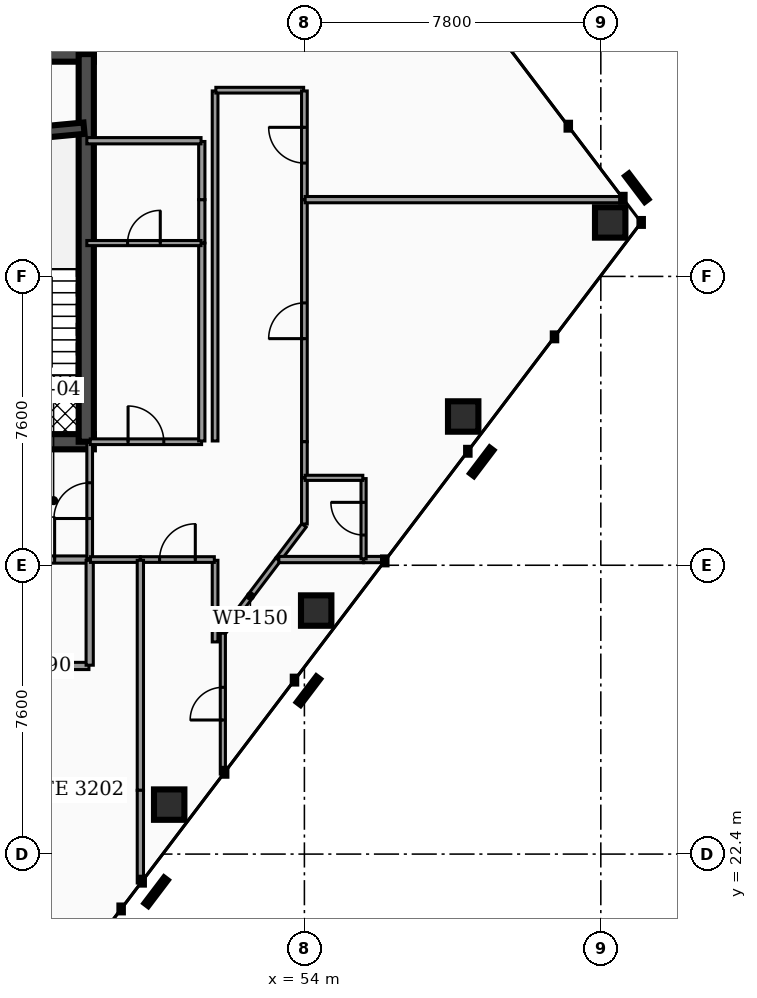
"""IFC4 building model, lengths in metres.
Left out: names, types, materials, properties, quantities, classifications, styles, units other than length and angle.
Written with IfcOpenShell. Run it as: python <this file> out.ifc"""

import sys

from ifc_helpers import new_model, si_unit, direction, frame, frame_2d, origin, origin_2d, place, context, subcontext, project, spatial, rectangle, hollow_rectangle, extrude, element, fill, save


model = new_model("IFC4")
c1 = context("Model", 3, precision=1e-05, world=origin(), true_north=direction((0.0, 1.0)))
c2 = subcontext(c1, "Body", "Model", "MODEL_VIEW")
j1 = project(units=[si_unit("LENGTHUNIT", "METRE"), si_unit("PLANEANGLEUNIT", "RADIAN")], contexts=[c1])
p1 = place(None, origin())
s1 = spatial("IfcSite", under=j1, at=p1, CompositionType="ELEMENT")
p2 = place(p1, origin())
s2 = spatial("IfcBuilding", under=s1, at=p2, CompositionType="ELEMENT")
p3 = place(p2, frame((0.0, 0.0, 134.64)))
s3 = spatial("IfcBuildingStorey", under=s2, at=p3, CompositionType="ELEMENT", Elevation=134.64)
p4 = place(p3, frame((28.4, 43.45, 0.0), z_axis=(0.0, 0.0, 1.0), x_axis=(1.0, 0.0, 0.0)))
e1 = element("IfcWall", 1, at=p4, inside=s3, PredefinedType="SHEAR", context=c2, shape_type="SweptSolid", body=[
    extrude(rectangle(XDim=20.06, YDim=0.4, at=frame_2d((10.03, 0.0))), origin(), (0.0, 0.0, 1.0), 3.5),
])
p5 = place(p3, frame((28.4, 33.25, 0.0), z_axis=(0.0, 0.0, 1.0), x_axis=(1.0, 0.0, 0.0)))
e2 = element("IfcWall", 2, at=p5, inside=s3, PredefinedType="SHEAR", context=c2, shape_type="SweptSolid", body=[
    extrude(rectangle(XDim=20.06, YDim=0.4, at=frame_2d((10.03, 0.0))), origin(), (0.0, 0.0, 1.0), 3.5),
])
p6 = place(p5, frame((4.03, 0.0, 0.0)))
e3 = element("IfcOpeningElement", 3, at=p6, cuts=e2, PredefinedType="OPENING", context=c2, shape_type="SweptSolid", body=[
    extrude(rectangle(XDim=1.1, YDim=2.15, at=frame_2d((0.55, 1.075))), frame((0.0, 0.21, 0.0), z_axis=(0.0, -1.0, 0.0), x_axis=(1.0, 0.0, 0.0)), (0.0, 0.0, 1.0), 0.42),
])
p7 = place(p5, frame((14.87, 0.0, 0.0)))
e4 = element("IfcOpeningElement", 4, at=p7, cuts=e2, PredefinedType="OPENING", context=c2, shape_type="SweptSolid", body=[
    extrude(rectangle(XDim=1.1, YDim=2.15, at=frame_2d((0.55, 1.075))), frame((0.0, 0.21, 0.0), z_axis=(0.0, -1.0, 0.0), x_axis=(1.0, 0.0, 0.0)), (0.0, 0.0, 1.0), 0.42),
])
p8 = place(p5, frame((5.95, 0.0, 0.0)))
e5 = element("IfcOpeningElement", 5, at=p8, cuts=e2, PredefinedType="OPENING", context=c2, shape_type="SweptSolid", body=[
    extrude(rectangle(XDim=1.0, YDim=2.1, at=frame_2d((0.5, 1.05))), frame((0.0, 0.21, 0.0), z_axis=(0.0, -1.0, 0.0), x_axis=(1.0, 0.0, 0.0)), (0.0, 0.0, 1.0), 0.42),
])
p9 = place(p5, frame((7.65, 0.0, 0.0)))
e6 = element("IfcOpeningElement", 6, at=p9, cuts=e2, PredefinedType="OPENING", context=c2, shape_type="SweptSolid", body=[
    extrude(rectangle(XDim=1.0, YDim=2.1, at=frame_2d((0.5, 1.05))), frame((0.0, 0.21, 0.0), z_axis=(0.0, -1.0, 0.0), x_axis=(1.0, 0.0, 0.0)), (0.0, 0.0, 1.0), 0.42),
])
p10 = place(p5, frame((1.31, 0.0, 0.0)))
e7 = element("IfcOpeningElement", 7, at=p10, cuts=e2, PredefinedType="OPENING", context=c2, shape_type="SweptSolid", body=[
    extrude(rectangle(XDim=1.1, YDim=2.2, at=frame_2d((0.55, 1.1))), frame((0.0, 0.21, 0.0), z_axis=(0.0, -1.0, 0.0), x_axis=(1.0, 0.0, 0.0)), (0.0, 0.0, 1.0), 0.42),
])
p11 = place(p5, frame((9.44, 0.0, 0.0)))
e8 = element("IfcOpeningElement", 8, at=p11, cuts=e2, PredefinedType="OPENING", context=c2, shape_type="SweptSolid", body=[
    extrude(rectangle(XDim=1.12, YDim=2.05, at=frame_2d((0.56, 1.025))), frame((0.0, 0.21, 0.0), z_axis=(0.0, -1.0, 0.0), x_axis=(1.0, 0.0, 0.0)), (0.0, 0.0, 1.0), 0.42),
])
p12 = place(p5, frame((17.65, 0.0, 0.0)))
e9 = element("IfcOpeningElement", 9, at=p12, cuts=e2, PredefinedType="OPENING", context=c2, shape_type="SweptSolid", body=[
    extrude(rectangle(XDim=1.1, YDim=2.2, at=frame_2d((0.55, 1.1))), frame((0.0, 0.21, 0.0), z_axis=(0.0, -1.0, 0.0), x_axis=(1.0, 0.0, 0.0)), (0.0, 0.0, 1.0), 0.42),
])
p13 = place(p3, frame((48.26, 33.25, 0.0), z_axis=(0.0, 0.0, 1.0), x_axis=(0.0, 1.0, 0.0)))
e10 = element("IfcWall", 10, at=p13, inside=s3, PredefinedType="SHEAR", context=c2, shape_type="SweptSolid", body=[
    extrude(rectangle(XDim=10.2, YDim=0.4, at=frame_2d((5.1, 0.0))), origin(), (0.0, 0.0, 1.0), 3.5),
])
p14 = place(p3, frame((44.98, 41.2, 0.0), z_axis=(0.0, 0.0, 1.0), x_axis=(0.995686468965, 0.09278176286, 0.0)))
e11 = element("IfcWall", 11, at=p14, inside=s3, PredefinedType="SHEAR", context=c2, shape_type="SweptSolid", body=[
    extrude(rectangle(XDim=3.234, YDim=0.3, at=frame_2d((1.617, 0.0))), origin(), (0.0, 0.0, 1.0), 3.5),
])
for number, where, z_axis, x_axis in (
    (12, (50.442, 23.702, 0.0), (0.0, 0.0, 1.0), (1.0, 0.0, 0.0)),
    (13, (54.31, 28.808, 0.0), (0.0, 0.0, 1.0), (1.0, 0.0, 0.0)),
    (14, (58.178, 33.914, 0.0), (0.0, 0.0, 1.0), (1.0, 0.0, 0.0)),
    (15, (62.047, 39.02, 0.0), (0.0, 0.0, 1.0), (1.0, 0.0, 0.0)),
):
    element("IfcColumn", number, at=place(p3, frame(where, z_axis=z_axis, x_axis=x_axis)), inside=s3, PredefinedType="COLUMN", context=c2, shape_type="SweptSolid", body=[
        extrude(hollow_rectangle(XDim=0.8, YDim=0.8, WallThickness=0.04, at=origin_2d()), origin(), (0.0, 0.0, 1.0), 3.5),
    ])
p15 = place(p3, frame((45.405, 30.15, 0.0), z_axis=(0.0, 0.0, 1.0), x_axis=(1.0, 0.0, 0.0)))
e16 = element("IfcWall", 16, at=p15, inside=s3, PredefinedType="PARTITIONING", context=c2, shape_type="SweptSolid", body=[
    extrude(rectangle(XDim=2.925, YDim=0.19, at=frame_2d((1.462, 0.0))), origin(), (0.0, 0.0, 1.0), 2.457),
])
p16 = place(p15, frame((0.903, 0.0, 0.0)))
e17 = element("IfcOpeningElement", 17, at=p16, cuts=e16, PredefinedType="OPENING", context=c2, shape_type="SweptSolid", body=[
    extrude(rectangle(XDim=1.12, YDim=2.05, at=frame_2d((0.56, 1.025))), frame((0.0, 0.105, 0.0), z_axis=(0.0, -1.0, 0.0), x_axis=(1.0, 0.0, 0.0)), (0.0, 0.0, 1.0), 0.21),
])
p17 = place(p3, frame((48.35, 30.17, 0.0), z_axis=(0.0, 0.0, 1.0), x_axis=(0.0, 1.0, 0.0)))
e18 = element("IfcWall", 18, at=p17, inside=s3, PredefinedType="PARTITIONING", context=c2, shape_type="SweptSolid", body=[
    extrude(rectangle(XDim=3.06, YDim=0.15, at=frame_2d((1.53, 0.0))), origin(), (0.0, 0.0, 1.0), 2.457),
])
p18 = place(p17, frame((1.06, 0.0, 0.0)))
e19 = element("IfcOpeningElement", 19, at=p18, cuts=e18, PredefinedType="OPENING", context=c2, shape_type="SweptSolid", body=[
    extrude(rectangle(XDim=0.94, YDim=2.05, at=frame_2d((0.47, 1.025))), frame((0.0, 0.085, 0.0), z_axis=(0.0, -1.0, 0.0), x_axis=(1.0, 0.0, 0.0)), (0.0, 0.0, 1.0), 0.17),
])
p19 = place(p3, frame((45.42, 27.35, 0.0), z_axis=(0.0, 0.0, 1.0), x_axis=(1.0, 0.0, 0.0)))
e20 = element("IfcWall", 20, at=p19, inside=s3, PredefinedType="PARTITIONING", context=c2, shape_type="SweptSolid", body=[
    extrude(rectangle(XDim=2.91, YDim=0.19, at=frame_2d((1.455, 0.0))), origin(), (0.0, 0.0, 1.0), 2.457),
])
p20 = place(p3, frame((48.35, 27.37, 0.0), z_axis=(0.0, 0.0, 1.0), x_axis=(0.0, 1.0, 0.0)))
e21 = element("IfcWall", 21, at=p20, inside=s3, PredefinedType="PARTITIONING", context=c2, shape_type="SweptSolid", body=[
    extrude(rectangle(XDim=2.76, YDim=0.19, at=frame_2d((1.38, 0.0))), origin(), (0.0, 0.0, 1.0), 2.457),
])
p21 = place(p3, frame((48.37, 30.15, 0.0), z_axis=(0.0, 0.0, 1.0), x_axis=(1.0, 0.0, 0.0)))
e22 = element("IfcWall", 22, at=p21, inside=s3, PredefinedType="PARTITIONING", context=c2, shape_type="SweptSolid", body=[
    extrude(rectangle(XDim=1.309, YDim=0.15, at=frame_2d((0.654, 0.0))), origin(), (0.0, 0.0, 1.0), 2.457),
])
p22 = place(p3, frame((51.65, 27.982, 0.0), z_axis=(0.0, 0.0, 1.0), x_axis=(0.0, 1.0, 0.0)))
e23 = element("IfcWall", 23, at=p22, inside=s3, PredefinedType="PARTITIONING", context=c2, shape_type="SweptSolid", body=[
    extrude(rectangle(XDim=2.147, YDim=0.15, at=frame_2d((1.074, 0.0))), origin(), (0.0, 0.0, 1.0), 2.457),
])
p23 = place(p3, frame((49.689, 30.15, 0.0), z_axis=(0.0, 0.0, 1.0), x_axis=(1.0, 0.0, 0.0)))
e24 = element("IfcWall", 24, at=p23, inside=s3, PredefinedType="PARTITIONING", context=c2, shape_type="SweptSolid", body=[
    extrude(rectangle(XDim=1.941, YDim=0.15, at=frame_2d((0.971, 0.0))), origin(), (0.0, 0.0, 1.0), 2.457),
])
p24 = place(p23, frame((0.501, 0.0, 0.0)))
e25 = element("IfcOpeningElement", 25, at=p24, cuts=e24, PredefinedType="OPENING", context=c2, shape_type="SweptSolid", body=[
    extrude(rectangle(XDim=0.94, YDim=2.05, at=frame_2d((0.47, 1.025))), frame((0.0, 0.085, 0.0), z_axis=(0.0, -1.0, 0.0), x_axis=(1.0, 0.0, 0.0)), (0.0, 0.0, 1.0), 0.17),
])
p25 = place(p3, frame((51.851, 28.228, 0.0), z_axis=(0.0, 0.0, 1.0), x_axis=(0.60378553019, 0.797146808018, 0.0)))
e26 = element("IfcWall", 26, at=p25, inside=s3, PredefinedType="PARTITIONING", context=c2, shape_type="SweptSolid", body=[
    extrude(rectangle(XDim=2.41, YDim=0.15, at=frame_2d((1.205, 0.0))), origin(), (0.0, 0.0, 1.0), 2.457),
])
p26 = place(p3, frame((54.0, 33.25, 0.0), z_axis=(0.0, 0.0, 1.0), x_axis=(0.0, 1.0, 0.0)))
e27 = element("IfcWall", 27, at=p26, inside=s3, PredefinedType="PARTITIONING", context=c2, shape_type="SweptSolid", body=[
    extrude(rectangle(XDim=6.365, YDim=0.15, at=frame_2d((3.183, 0.0))), origin(), (0.0, 0.0, 1.0), 2.457),
])
p27 = place(p26, frame((2.712, 0.0, 0.0)))
e28 = element("IfcOpeningElement", 28, at=p27, cuts=e27, PredefinedType="OPENING", context=c2, shape_type="SweptSolid", body=[
    extrude(rectangle(XDim=0.94, YDim=2.05, at=frame_2d((0.47, 1.025))), frame((0.0, 0.085, 0.0), z_axis=(0.0, -1.0, 0.0), x_axis=(1.0, 0.0, 0.0)), (0.0, 0.0, 1.0), 0.17),
])
p28 = place(p3, frame((54.0, 32.305, 0.0), z_axis=(0.0, 0.0, 1.0), x_axis=(0.0, 1.0, 0.0)))
e29 = element("IfcWall", 29, at=p28, inside=s3, PredefinedType="PARTITIONING", context=c2, shape_type="SweptSolid", body=[
    extrude(rectangle(XDim=0.945, YDim=0.15, at=frame_2d((0.473, 0.0))), origin(), (0.0, 0.0, 1.0), 2.457),
])
p29 = place(p3, frame((54.0, 31.085, 0.0), z_axis=(0.0, 0.0, 1.0), x_axis=(0.0, 1.0, 0.0)))
e30 = element("IfcWall", 30, at=p29, inside=s3, PredefinedType="PARTITIONING", context=c2, shape_type="SweptSolid", body=[
    extrude(rectangle(XDim=1.21, YDim=0.15, at=frame_2d((0.605, 0.0))), origin(), (0.0, 0.0, 1.0), 2.457),
])
p30 = place(p3, frame((53.31, 30.154, 0.0), z_axis=(0.0, 0.0, 1.0), x_axis=(0.603752960425, 0.797171476395, 0.0)))
e31 = element("IfcWall", 31, at=p30, inside=s3, PredefinedType="PARTITIONING", context=c2, shape_type="SweptSolid", body=[
    extrude(rectangle(XDim=1.122, YDim=0.15, at=frame_2d((0.561, 0.0))), origin(), (0.0, 0.0, 1.0), 2.457),
])
p31 = place(p3, frame((51.65, 33.27, 0.0), z_axis=(0.0, 0.0, 1.0), x_axis=(0.0, 1.0, 0.0)))
e32 = element("IfcWall", 32, at=p31, inside=s3, PredefinedType="PARTITIONING", context=c2, shape_type="SweptSolid", body=[
    extrude(rectangle(XDim=9.21, YDim=0.15, at=frame_2d((4.605, 0.0))), origin(), (0.0, 0.0, 1.0), 2.457),
])
p32 = place(p3, frame((51.67, 42.5, 0.0), z_axis=(0.0, 0.0, 1.0), x_axis=(1.0, 0.0, 0.0)))
e33 = element("IfcWall", 33, at=p32, inside=s3, PredefinedType="PARTITIONING", context=c2, shape_type="SweptSolid", body=[
    extrude(rectangle(XDim=2.31, YDim=0.15, at=frame_2d((1.155, 0.0))), origin(), (0.0, 0.0, 1.0), 2.457),
])
p33 = place(p3, frame((54.0, 39.625, 0.0), z_axis=(0.0, 0.0, 1.0), x_axis=(0.0, 1.0, 0.0)))
e34 = element("IfcWall", 34, at=p33, inside=s3, PredefinedType="PARTITIONING", context=c2, shape_type="SweptSolid", body=[
    extrude(rectangle(XDim=2.855, YDim=0.15, at=frame_2d((1.427, 0.0))), origin(), (0.0, 0.0, 1.0), 2.457),
])
p34 = place(p33, frame((0.958, 0.0, 0.0)))
e35 = element("IfcOpeningElement", 35, at=p34, cuts=e34, PredefinedType="OPENING", context=c2, shape_type="SweptSolid", body=[
    extrude(rectangle(XDim=0.94, YDim=2.05, at=frame_2d((0.47, 1.025))), frame((0.0, 0.085, 0.0), z_axis=(0.0, -1.0, 0.0), x_axis=(1.0, 0.0, 0.0)), (0.0, 0.0, 1.0), 0.17),
])
p35 = place(p3, frame((48.365, 33.25, 0.0), z_axis=(0.0, 0.0, 1.0), x_axis=(1.0, 0.0, 0.0)))
e36 = element("IfcWall", 36, at=p35, inside=s3, PredefinedType="PARTITIONING", context=c2, shape_type="SweptSolid", body=[
    extrude(rectangle(XDim=2.93, YDim=0.15, at=frame_2d((1.465, 0.0))), origin(), (0.0, 0.0, 1.0), 2.457),
])
p36 = place(p35, frame((0.995, 0.0, 0.0)))
e37 = element("IfcOpeningElement", 37, at=p36, cuts=e36, PredefinedType="OPENING", context=c2, shape_type="SweptSolid", body=[
    extrude(rectangle(XDim=0.94, YDim=2.05, at=frame_2d((0.47, 1.025))), frame((0.0, 0.085, 0.0), z_axis=(0.0, -1.0, 0.0), x_axis=(1.0, 0.0, 0.0)), (0.0, 0.0, 1.0), 0.17),
])
p37 = place(p3, frame((49.684, 24.078, 0.0), z_axis=(0.0, 0.0, 1.0), x_axis=(0.0, 1.0, 0.0)))
e38 = element("IfcWall", 38, at=p37, inside=s3, PredefinedType="PARTITIONING", context=c2, shape_type="SweptSolid", body=[
    extrude(rectangle(XDim=6.052, YDim=0.165, at=frame_2d((3.026, 0.0))), origin(), (0.0, 0.0, 1.0), 2.457),
])
p38 = place(p3, frame((49.684, 21.639, 0.0), z_axis=(0.0, 0.0, 1.0), x_axis=(0.0, 1.0, 0.0)))
e39 = element("IfcWall", 39, at=p38, inside=s3, PredefinedType="PARTITIONING", context=c2, shape_type="SweptSolid", body=[
    extrude(rectangle(XDim=2.438, YDim=0.165, at=frame_2d((1.219, 0.0))), origin(), (0.0, 0.0, 1.0), 2.457),
])
p39 = place(p3, frame((51.854, 24.504, 0.0), z_axis=(0.0, 0.0, 1.0), x_axis=(0.0, 1.0, 0.0)))
e40 = element("IfcWall", 40, at=p39, inside=s3, PredefinedType="PARTITIONING", context=c2, shape_type="SweptSolid", body=[
    extrude(rectangle(XDim=3.708, YDim=0.135, at=frame_2d((1.854, 0.0))), origin(), (0.0, 0.0, 1.0), 2.457),
])
p40 = place(p39, frame((1.424, 0.0, 0.0)))
e41 = element("IfcOpeningElement", 41, at=p40, cuts=e40, PredefinedType="OPENING", context=c2, shape_type="SweptSolid", body=[
    extrude(rectangle(XDim=0.86, YDim=2.05, at=frame_2d((0.43, 1.025))), frame((0.0, 0.077, 0.0), z_axis=(0.0, -1.0, 0.0), x_axis=(1.0, 0.0, 0.0)), (0.0, 0.0, 1.0), 0.155),
])
p41 = place(p3, frame((55.562, 30.15, 0.0), z_axis=(0.0, 0.0, 1.0), x_axis=(1.0, 0.0, 0.0)))
e42 = element("IfcWall", 42, at=p41, inside=s3, PredefinedType="PARTITIONING", context=c2, shape_type="SweptSolid", body=[
    extrude(rectangle(XDim=0.565, YDim=0.165, at=frame_2d((0.283, 0.0))), origin(), (0.0, 0.0, 1.0), 2.457),
])
p42 = place(p3, frame((53.327, 30.15, 0.0), z_axis=(0.0, 0.0, 1.0), x_axis=(1.0, 0.0, 0.0)))
e43 = element("IfcWall", 43, at=p42, inside=s3, PredefinedType="PARTITIONING", context=c2, shape_type="SweptSolid", body=[
    extrude(rectangle(XDim=2.225, YDim=0.165, at=frame_2d((1.113, 0.0))), origin(), (0.0, 0.0, 1.0), 2.457),
])
p43 = place(p3, frame((55.557, 30.17, 0.0), z_axis=(0.0, 0.0, 1.0), x_axis=(0.0, 1.0, 0.0)))
e44 = element("IfcWall", 44, at=p43, inside=s3, PredefinedType="PARTITIONING", context=c2, shape_type="SweptSolid", body=[
    extrude(rectangle(XDim=2.11, YDim=0.135, at=frame_2d((1.055, 0.0))), origin(), (0.0, 0.0, 1.0), 2.457),
])
p44 = place(p43, frame((0.625, 0.0, 0.0)))
e45 = element("IfcOpeningElement", 45, at=p44, cuts=e44, PredefinedType="OPENING", context=c2, shape_type="SweptSolid", body=[
    extrude(rectangle(XDim=0.86, YDim=2.05, at=frame_2d((0.43, 1.025))), frame((0.0, 0.077, 0.0), z_axis=(0.0, -1.0, 0.0), x_axis=(1.0, 0.0, 0.0)), (0.0, 0.0, 1.0), 0.155),
])
p45 = place(p3, frame((54.02, 32.3, 0.0), z_axis=(0.0, 0.0, 1.0), x_axis=(1.0, 0.0, 0.0)))
e46 = element("IfcWall", 46, at=p45, inside=s3, PredefinedType="PARTITIONING", context=c2, shape_type="SweptSolid", body=[
    extrude(rectangle(XDim=1.517, YDim=0.135, at=frame_2d((0.759, 0.0))), origin(), (0.0, 0.0, 1.0), 2.457),
])
p46 = place(p3, frame((54.02, 39.62, 0.0), z_axis=(0.0, 0.0, 1.0), x_axis=(1.0, 0.0, 0.0)))
e47 = element("IfcWall", 47, at=p46, inside=s3, PredefinedType="PARTITIONING", context=c2, shape_type="SweptSolid", body=[
    extrude(rectangle(XDim=8.373, YDim=0.165, at=frame_2d((4.186, 0.0))), origin(), (0.0, 0.0, 1.0), 2.457),
])
p47 = place(p3, frame((51.3, 33.27, 0.0), z_axis=(0.0, 0.0, 1.0), x_axis=(0.0, 1.0, 0.0)))
e48 = element("IfcWall", 48, at=p47, inside=s3, PredefinedType="PARTITIONING", context=c2, shape_type="SweptSolid", body=[
    extrude(rectangle(XDim=5.202, YDim=0.165, at=frame_2d((2.601, 0.0))), origin(), (0.0, 0.0, 1.0), 2.457),
])
p48 = place(p3, frame((51.3, 38.482, 0.0), z_axis=(0.0, 0.0, 1.0), x_axis=(0.0, 1.0, 0.0)))
e49 = element("IfcWall", 49, at=p48, inside=s3, PredefinedType="PARTITIONING", context=c2, shape_type="SweptSolid", body=[
    extrude(rectangle(XDim=1.138, YDim=0.165, at=frame_2d((0.569, 0.0))), origin(), (0.0, 0.0, 1.0), 2.457),
])
p49 = place(p3, frame((51.3, 39.62, 0.0), z_axis=(0.0, 0.0, 1.0), x_axis=(0.0, 1.0, 0.0)))
e50 = element("IfcWall", 50, at=p49, inside=s3, PredefinedType="PARTITIONING", context=c2, shape_type="SweptSolid", body=[
    extrude(rectangle(XDim=1.53, YDim=0.165, at=frame_2d((0.765, 0.0))), origin(), (0.0, 0.0, 1.0), 2.457),
])
p50 = place(p3, frame((48.275, 41.17, 0.0), z_axis=(0.0, 0.0, 1.0), x_axis=(1.0, 0.0, 0.0)))
e51 = element("IfcWall", 51, at=p50, inside=s3, PredefinedType="PARTITIONING", context=c2, shape_type="SweptSolid", body=[
    extrude(rectangle(XDim=3.005, YDim=0.165, at=frame_2d((1.502, 0.0))), origin(), (0.0, 0.0, 1.0), 2.457),
])
p51 = place(p3, frame((48.275, 38.477, 0.0), z_axis=(0.0, 0.0, 1.0), x_axis=(1.0, 0.0, 0.0)))
e52 = element("IfcWall", 52, at=p51, inside=s3, PredefinedType="PARTITIONING", context=c2, shape_type="SweptSolid", body=[
    extrude(rectangle(XDim=3.005, YDim=0.135, at=frame_2d((1.502, 0.0))), origin(), (0.0, 0.0, 1.0), 2.457),
])
p52 = place(p51, frame((1.073, 0.0, 0.0)))
e53 = element("IfcOpeningElement", 53, at=p52, cuts=e52, PredefinedType="OPENING", context=c2, shape_type="SweptSolid", body=[
    extrude(rectangle(XDim=0.86, YDim=2.05, at=frame_2d((0.43, 1.025))), frame((0.0, 0.077, 0.0), z_axis=(0.0, -1.0, 0.0), x_axis=(1.0, 0.0, 0.0)), (0.0, 0.0, 1.0), 0.155),
])
p53 = place(p16, origin())
e54 = element("IfcDoor", 54, at=p53, inside=s3, OperationType="SINGLE_SWING_RIGHT", PredefinedType="DOOR", context=c2, shape_type="SweptSolid", body=[
    extrude(rectangle(XDim=1.12, YDim=2.05, at=frame_2d((0.56, 1.025))), frame((0.0, 0.025, 0.0), z_axis=(0.0, -1.0, 0.0), x_axis=(1.0, 0.0, 0.0)), (0.0, 0.0, 1.0), 0.05),
])
fill(e17, e54)
p54 = place(p18, origin())
e55 = element("IfcDoor", 55, at=p54, inside=s3, OperationType="SINGLE_SWING_LEFT", PredefinedType="DOOR", context=c2, shape_type="SweptSolid", body=[
    extrude(rectangle(XDim=0.94, YDim=2.05, at=frame_2d((0.47, 1.025))), frame((0.0, 0.025, 0.0), z_axis=(0.0, -1.0, 0.0), x_axis=(1.0, 0.0, 0.0)), (0.0, 0.0, 1.0), 0.05),
])
fill(e19, e55)
p55 = place(p24, origin())
e56 = element("IfcDoor", 56, at=p55, inside=s3, OperationType="SINGLE_SWING_RIGHT", PredefinedType="DOOR", context=c2, shape_type="SweptSolid", body=[
    extrude(rectangle(XDim=0.94, YDim=2.05, at=frame_2d((0.47, 1.025))), frame((0.0, 0.025, 0.0), z_axis=(0.0, -1.0, 0.0), x_axis=(1.0, 0.0, 0.0)), (0.0, 0.0, 1.0), 0.05),
])
fill(e25, e56)
p56 = place(p27, origin())
e57 = element("IfcDoor", 57, at=p56, inside=s3, OperationType="SINGLE_SWING_LEFT", PredefinedType="DOOR", context=c2, shape_type="SweptSolid", body=[
    extrude(rectangle(XDim=0.94, YDim=2.05, at=frame_2d((0.47, 1.025))), frame((0.0, 0.025, 0.0), z_axis=(0.0, -1.0, 0.0), x_axis=(1.0, 0.0, 0.0)), (0.0, 0.0, 1.0), 0.05),
])
fill(e28, e57)
p57 = place(p34, origin())
e58 = element("IfcDoor", 58, at=p57, inside=s3, OperationType="SINGLE_SWING_RIGHT", PredefinedType="DOOR", context=c2, shape_type="SweptSolid", body=[
    extrude(rectangle(XDim=0.94, YDim=2.05, at=frame_2d((0.47, 1.025))), frame((0.0, 0.025, 0.0), z_axis=(0.0, -1.0, 0.0), x_axis=(1.0, 0.0, 0.0)), (0.0, 0.0, 1.0), 0.05),
])
fill(e35, e58)
p58 = place(p36, origin())
e59 = element("IfcDoor", 59, at=p58, inside=s3, OperationType="SINGLE_SWING_LEFT", PredefinedType="DOOR", context=c2, shape_type="SweptSolid", body=[
    extrude(rectangle(XDim=0.94, YDim=2.05, at=frame_2d((0.47, 1.025))), frame((0.0, 0.025, 0.0), z_axis=(0.0, -1.0, 0.0), x_axis=(1.0, 0.0, 0.0)), (0.0, 0.0, 1.0), 0.05),
])
fill(e37, e59)
p59 = place(p40, origin())
e60 = element("IfcDoor", 60, at=p59, inside=s3, OperationType="SINGLE_SWING_LEFT", PredefinedType="DOOR", context=c2, shape_type="SweptSolid", body=[
    extrude(rectangle(XDim=0.86, YDim=2.05, at=frame_2d((0.43, 1.025))), frame((0.0, 0.025, 0.0), z_axis=(0.0, -1.0, 0.0), x_axis=(1.0, 0.0, 0.0)), (0.0, 0.0, 1.0), 0.05),
])
fill(e41, e60)
p60 = place(p44, origin())
e61 = element("IfcDoor", 61, at=p60, inside=s3, OperationType="SINGLE_SWING_RIGHT", PredefinedType="DOOR", context=c2, shape_type="SweptSolid", body=[
    extrude(rectangle(XDim=0.86, YDim=2.05, at=frame_2d((0.43, 1.025))), frame((0.0, 0.025, 0.0), z_axis=(0.0, -1.0, 0.0), x_axis=(1.0, 0.0, 0.0)), (0.0, 0.0, 1.0), 0.05),
])
fill(e45, e61)
p61 = place(p52, origin())
e62 = element("IfcDoor", 62, at=p61, inside=s3, OperationType="SINGLE_SWING_RIGHT", PredefinedType="DOOR", context=c2, shape_type="SweptSolid", body=[
    extrude(rectangle(XDim=0.86, YDim=2.05, at=frame_2d((0.43, 1.025))), frame((0.0, 0.025, 0.0), z_axis=(0.0, -1.0, 0.0), x_axis=(1.0, 0.0, 0.0)), (0.0, 0.0, 1.0), 0.05),
])
fill(e53, e62)
save(model, sys.argv[1])
